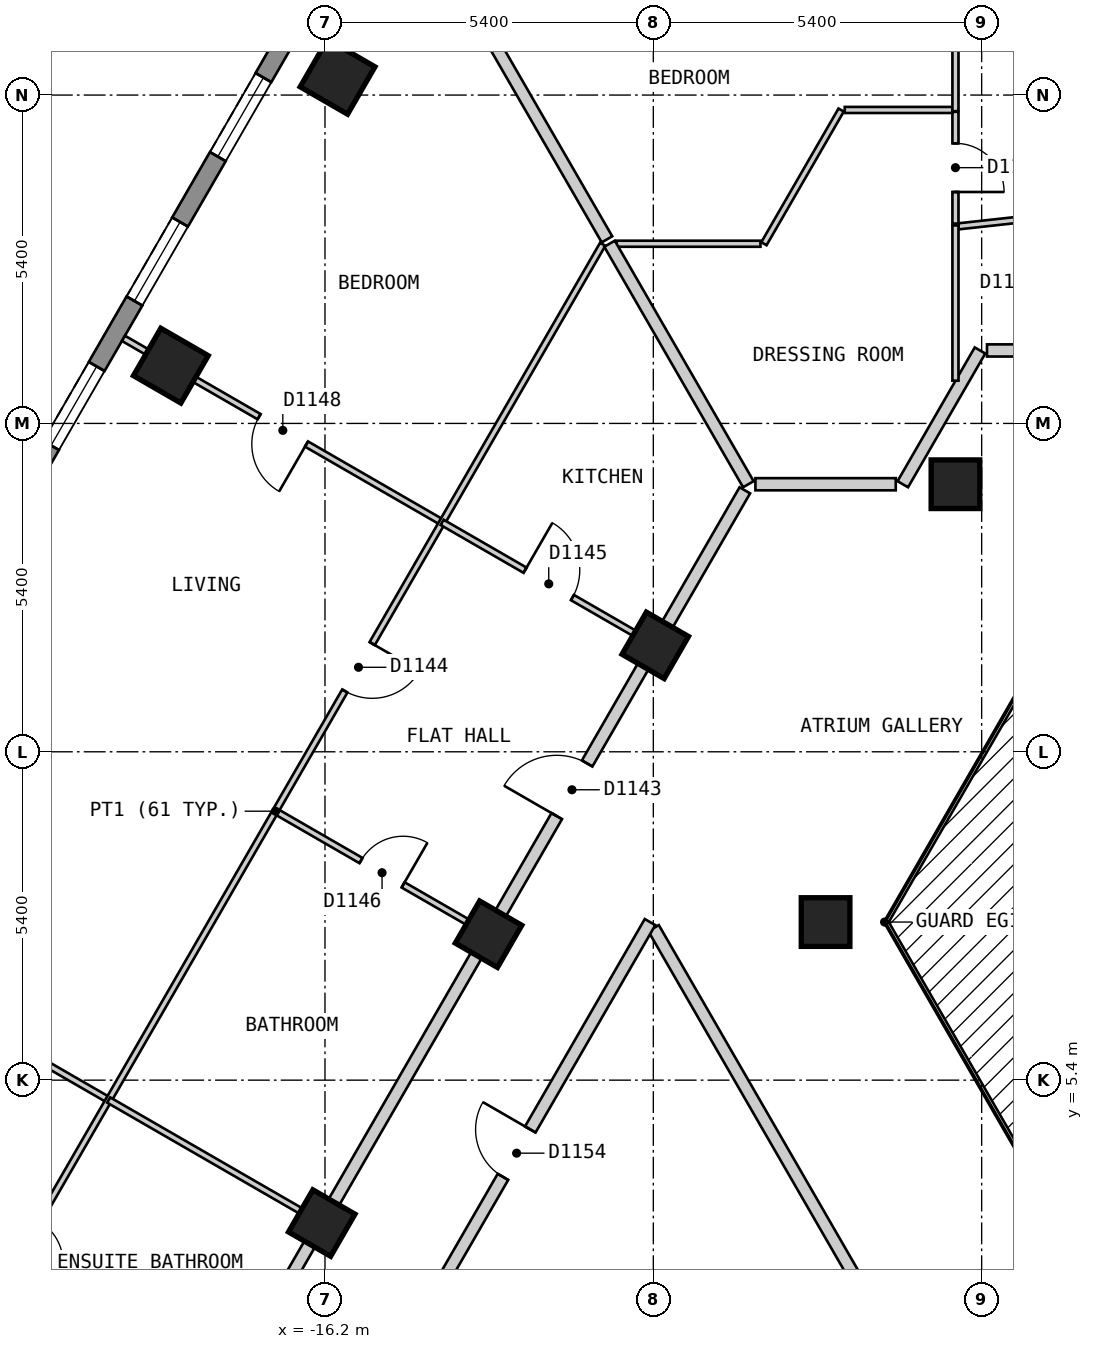
"""IFC4 building model, lengths in metres.
Left out: names, types, materials, properties, quantities, classifications, styles, units other than length and angle.
Written with IfcOpenShell. Run it as: python <this file> out.ifc"""

import sys

from ifc_helpers import new_model, si_unit, direction, frame, frame_2d, origin, origin_2d, place, context, subcontext, project, spatial, polyline, rectangle, outline, extrude, element, fill, save


model = new_model("IFC4")
c1 = context("Model", 3, precision=1e-05, world=origin(), true_north=direction((0.0, 1.0)))
c2 = subcontext(c1, "Body", "Model", "MODEL_VIEW")
j1 = project(units=[si_unit("LENGTHUNIT", "METRE"), si_unit("PLANEANGLEUNIT", "RADIAN")], contexts=[c1])
p1 = place(None, origin())
s1 = spatial("IfcSite", under=j1, at=p1, CompositionType="ELEMENT")
p2 = place(p1, origin())
s2 = spatial("IfcBuilding", under=s1, at=p2, CompositionType="ELEMENT")
p3 = place(p2, frame((0.0, 0.0, 138.6)))
s3 = spatial("IfcBuildingStorey", under=s2, at=p3, CompositionType="ELEMENT", Elevation=138.6)
for number, where, z_axis, x_axis in (
    (1, (-15.993, 21.9, 0.0), (0.0, 0.0, 1.0), (-0.5, -0.866, 0.0)),
    (2, (-18.735, 17.15, 0.0), (0.0, 0.0, 1.0), (-0.5, -0.866, 0.0)),
):
    element("IfcColumn", number, at=place(p3, frame(where, z_axis=z_axis, x_axis=x_axis)), inside=s3, PredefinedType="COLUMN", context=c2, shape_type="SweptSolid", body=[
        extrude(rectangle(XDim=0.9, YDim=0.9, at=origin_2d()), origin(), (0.0, 0.0, 1.0), 3.0),
    ])
for number, where, z_axis, x_axis in (
    (3, (-5.831, 15.2, 0.0), (0.0, 0.0, 1.0), (-1.0, 0.0, 0.0)),
    (4, (-10.768, 12.55, 0.0), (0.0, 0.0, 1.0), (-0.5, -0.866, 0.0)),
    (5, (-7.967, 8.0, 0.0), (0.0, 0.0, 1.0), (1.0, 0.0, 0.0)),
    (6, (-13.51, 7.8, 0.0), (0.0, 0.0, 1.0), (-0.5, -0.866, 0.0)),
    (7, (-16.253, 3.05, 0.0), (0.0, 0.0, 1.0), (-0.5, -0.866, 0.0)),
):
    element("IfcColumn", number, at=place(p3, frame(where, z_axis=z_axis, x_axis=x_axis)), inside=s3, PredefinedType="COLUMN", context=c2, shape_type="SweptSolid", body=[
        extrude(rectangle(XDim=0.8, YDim=0.8, at=origin_2d()), origin(), (0.0, 0.0, 1.0), 3.0),
    ])
p4 = place(p3, frame((-16.555, 23.025, 0.0), z_axis=(0.0, 0.0, 1.0), x_axis=(-0.500020536353, -0.866013546791, 0.0)))
e8 = element("IfcWall", 8, at=p4, inside=s3, PredefinedType="SOLIDWALL", context=c2, shape_type="SweptSolid", body=[
    extrude(outline(polyline([(0.0, -0.15), (23.325, -0.15), (23.245, 0.15), (0.08, 0.15), (0.0, -0.15)])), origin(), (0.0, 0.0, 1.0), 2.7),
])
p5 = place(p4, frame((1.314, 0.0, 0.15)))
e9 = element("IfcOpeningElement", 9, at=p5, cuts=e8, PredefinedType="OPENING", context=c2, shape_type="SweptSolid", body=[
    extrude(rectangle(XDim=1.5, YDim=2.1, at=frame_2d((0.75, 1.05))), frame((0.0, 0.16, 0.0), z_axis=(0.0, -1.0, 0.0), x_axis=(1.0, 0.0, 0.0)), (0.0, 0.0, 1.0), 0.32),
])
p6 = place(p4, frame((4.056, 0.0, 0.15)))
e10 = element("IfcOpeningElement", 10, at=p6, cuts=e8, PredefinedType="OPENING", context=c2, shape_type="SweptSolid", body=[
    extrude(rectangle(XDim=1.5, YDim=2.1, at=frame_2d((0.75, 1.05))), frame((0.0, 0.16, 0.0), z_axis=(0.0, -1.0, 0.0), x_axis=(1.0, 0.0, 0.0)), (0.0, 0.0, 1.0), 0.32),
])
p7 = place(p4, frame((6.799, 0.0, 0.15)))
e11 = element("IfcOpeningElement", 11, at=p7, cuts=e8, PredefinedType="OPENING", context=c2, shape_type="SweptSolid", body=[
    extrude(rectangle(XDim=1.5, YDim=2.1, at=frame_2d((0.75, 1.05))), frame((0.0, 0.16, 0.0), z_axis=(0.0, -1.0, 0.0), x_axis=(1.0, 0.0, 0.0)), (0.0, 0.0, 1.0), 0.32),
])
p8 = place(p4, frame((9.541, 0.0, 0.15)))
e12 = element("IfcOpeningElement", 12, at=p8, cuts=e8, PredefinedType="OPENING", context=c2, shape_type="SweptSolid", body=[
    extrude(rectangle(XDim=1.5, YDim=2.1, at=frame_2d((0.75, 1.05))), frame((0.0, 0.16, 0.0), z_axis=(0.0, -1.0, 0.0), x_axis=(1.0, 0.0, 0.0)), (0.0, 0.0, 1.0), 0.32),
])
p9 = place(p4, frame((12.285, 0.0, 0.15)))
e13 = element("IfcOpeningElement", 13, at=p9, cuts=e8, PredefinedType="OPENING", context=c2, shape_type="SweptSolid", body=[
    extrude(rectangle(XDim=1.5, YDim=2.1, at=frame_2d((0.75, 1.05))), frame((0.0, 0.16, 0.0), z_axis=(0.0, -1.0, 0.0), x_axis=(1.0, 0.0, 0.0)), (0.0, 0.0, 1.0), 0.32),
])
p10 = place(p4, frame((15.027, 0.0, 0.15)))
e14 = element("IfcOpeningElement", 14, at=p10, cuts=e8, PredefinedType="OPENING", context=c2, shape_type="SweptSolid", body=[
    extrude(rectangle(XDim=1.5, YDim=2.1, at=frame_2d((0.75, 1.05))), frame((0.0, 0.16, 0.0), z_axis=(0.0, -1.0, 0.0), x_axis=(1.0, 0.0, 0.0)), (0.0, 0.0, 1.0), 0.32),
])
p11 = place(p4, frame((17.769, 0.0, 0.15)))
e15 = element("IfcOpeningElement", 15, at=p11, cuts=e8, PredefinedType="OPENING", context=c2, shape_type="SweptSolid", body=[
    extrude(rectangle(XDim=1.5, YDim=2.1, at=frame_2d((0.75, 1.05))), frame((0.0, 0.16, 0.0), z_axis=(0.0, -1.0, 0.0), x_axis=(1.0, 0.0, 0.0)), (0.0, 0.0, 1.0), 0.32),
])
p12 = place(p4, frame((20.512, 0.0, 0.15)))
e16 = element("IfcOpeningElement", 16, at=p12, cuts=e8, PredefinedType="OPENING", context=c2, shape_type="SweptSolid", body=[
    extrude(rectangle(XDim=1.5, YDim=2.1, at=frame_2d((0.75, 1.05))), frame((0.0, 0.16, 0.0), z_axis=(0.0, -1.0, 0.0), x_axis=(1.0, 0.0, 0.0)), (0.0, 0.0, 1.0), 0.32),
])
p13 = place(p3, frame((-10.796, 7.9, 0.0), z_axis=(0.0, 0.0, 1.0), x_axis=(0.499954271211, -0.866051803703, 0.0)))
e17 = element("IfcWall", 17, at=p13, inside=s3, PredefinedType="PARTITIONING", context=c2, shape_type="SweptSolid", body=[
    extrude(rectangle(XDim=7.536, YDim=0.2, at=frame_2d((3.768, 0.0))), origin(), (0.0, 0.0, 1.0), 2.7),
])
p14 = place(p3, frame((-9.121, 15.2, 0.0), z_axis=(0.0, 0.0, 1.0), x_axis=(1.0, 0.0, 0.0)))
e18 = element("IfcWall", 18, at=p14, inside=s3, PredefinedType="PARTITIONING", context=c2, shape_type="SweptSolid", body=[
    extrude(rectangle(XDim=2.308, YDim=0.2, at=frame_2d((1.154, 0.0))), origin(), (0.0, 0.0, 1.0), 2.7),
])
p15 = place(p3, frame((-5.312, 17.4, 0.0), z_axis=(0.0, 0.0, 1.0), x_axis=(1.0, 0.0, 0.0)))
e19 = element("IfcWall", 19, at=p15, inside=s3, PredefinedType="PARTITIONING", context=c2, shape_type="SweptSolid", body=[
    extrude(rectangle(XDim=10.739, YDim=0.2, at=frame_2d((5.37, 0.0))), origin(), (0.0, 0.0, 1.0), 2.7),
])
p16 = place(p15, frame((7.538, 0.0, 0.0)))
e20 = element("IfcOpeningElement", 20, at=p16, cuts=e19, PredefinedType="OPENING", context=c2, shape_type="SweptSolid", body=[
    extrude(rectangle(XDim=1.0, YDim=2.1, at=frame_2d((0.5, 1.05))), frame((0.0, 0.11, 0.0), z_axis=(0.0, -1.0, 0.0), x_axis=(1.0, 0.0, 0.0)), (0.0, 0.0, 1.0), 0.22),
])
p17 = place(p15, frame((1.864, 0.0, 0.0)))
e21 = element("IfcOpeningElement", 21, at=p17, cuts=e19, PredefinedType="OPENING", context=c2, shape_type="SweptSolid", body=[
    extrude(rectangle(XDim=1.0, YDim=2.1, at=frame_2d((0.5, 1.05))), frame((0.0, 0.11, 0.0), z_axis=(0.0, -1.0, 0.0), x_axis=(1.0, 0.0, 0.0)), (0.0, 0.0, 1.0), 0.22),
])
p18 = place(p3, frame((-15.242, 0.399, 0.0), z_axis=(0.0, 0.0, 1.0), x_axis=(0.499953615651, 0.866052182145, 0.0)))
e22 = element("IfcWall", 22, at=p18, inside=s3, PredefinedType="PARTITIONING", context=c2, shape_type="SweptSolid", body=[
    extrude(rectangle(XDim=8.777, YDim=0.2, at=frame_2d((4.388, 0.0))), origin(), (0.0, 0.0, 1.0), 2.7),
])
p19 = place(p18, frame((3.938, 0.0, 0.0)))
e23 = element("IfcOpeningElement", 23, at=p19, cuts=e22, PredefinedType="OPENING", context=c2, shape_type="SweptSolid", body=[
    extrude(rectangle(XDim=0.9, YDim=2.1, at=frame_2d((0.45, 1.05))), frame((0.0, 0.11, 0.0), z_axis=(0.0, -1.0, 0.0), x_axis=(1.0, 0.0, 0.0)), (0.0, 0.0, 1.0), 0.22),
])
p20 = place(p3, frame((-6.697, 15.2, 0.0), z_axis=(0.0, 0.0, 1.0), x_axis=(0.499963722229, 0.866046347752, 0.0)))
e24 = element("IfcWall", 24, at=p20, inside=s3, PredefinedType="PARTITIONING", context=c2, shape_type="SweptSolid", body=[
    extrude(rectangle(XDim=2.54, YDim=0.2, at=frame_2d((1.27, 0.0))), origin(), (0.0, 0.0, 1.0), 2.7),
])
p21 = place(p3, frame((-17.724, 0.5, 0.0), z_axis=(0.0, 0.0, 1.0), x_axis=(0.499992388462, 0.866029798263, 0.0)))
e25 = element("IfcWall", 25, at=p21, inside=s3, PredefinedType="PARTITIONING", context=c2, shape_type="SweptSolid", body=[
    extrude(rectangle(XDim=16.859, YDim=0.2, at=frame_2d((8.429, 0.0))), origin(), (0.0, 0.0, 1.0), 2.7),
])
p22 = place(p21, frame((10.672, 0.0, 0.0)))
e26 = element("IfcOpeningElement", 26, at=p22, cuts=e25, PredefinedType="OPENING", context=c2, shape_type="SweptSolid", body=[
    extrude(rectangle(XDim=1.0, YDim=2.1, at=frame_2d((0.5, 1.05))), frame((0.0, 0.11, 0.0), z_axis=(0.0, -1.0, 0.0), x_axis=(1.0, 0.0, 0.0)), (0.0, 0.0, 1.0), 0.22),
])
p23 = place(p3, frame((-5.831, 21.325, 0.0), z_axis=(0.0, 0.0, 1.0), x_axis=(0.0, -1.0, 0.0)))
e27 = element("IfcWall", 27, at=p23, inside=s3, PredefinedType="PARTITIONING", context=c2, shape_type="SweptSolid", body=[
    extrude(rectangle(XDim=1.839, YDim=0.1, at=frame_2d((0.919, 0.0))), origin(), (0.0, 0.0, 1.0), 2.7),
])
p24 = place(p23, frame((0.519, 0.0, 0.0)))
e28 = element("IfcOpeningElement", 28, at=p24, cuts=e27, PredefinedType="OPENING", context=c2, shape_type="SweptSolid", body=[
    extrude(rectangle(XDim=0.8, YDim=2.1, at=frame_2d((0.4, 1.05))), frame((0.0, 0.06, 0.0), z_axis=(0.0, -1.0, 0.0), x_axis=(1.0, 0.0, 0.0)), (0.0, 0.0, 1.0), 0.12),
])
p25 = place(p3, frame((-24.999, 8.1, 0.0), z_axis=(0.0, 0.0, 1.0), x_axis=(0.865978029808, -0.500082045158, 0.0)))
e29 = element("IfcWall", 29, at=p25, inside=s3, PredefinedType="PARTITIONING", context=c2, shape_type="SweptSolid", body=[
    extrude(rectangle(XDim=6.053, YDim=0.1, at=frame_2d((3.027, 0.0))), origin(), (0.0, 0.0, 1.0), 2.7),
])
p26 = place(p25, frame((2.577, 0.0, 0.0)))
e30 = element("IfcOpeningElement", 30, at=p26, cuts=e29, PredefinedType="OPENING", context=c2, shape_type="SweptSolid", body=[
    extrude(rectangle(XDim=0.9, YDim=2.1, at=frame_2d((0.45, 1.05))), frame((0.0, 0.06, 0.0), z_axis=(0.0, -1.0, 0.0), x_axis=(1.0, 0.0, 0.0)), (0.0, 0.0, 1.0), 0.12),
])
p27 = place(p3, frame((-16.971, 9.798, 0.0), z_axis=(0.0, 0.0, 1.0), x_axis=(0.866087525071, -0.499892387336, 0.0)))
e31 = element("IfcWall", 31, at=p27, inside=s3, PredefinedType="PARTITIONING", context=c2, shape_type="SweptSolid", body=[
    extrude(rectangle(XDim=3.897, YDim=0.1, at=frame_2d((1.948, 0.0))), origin(), (0.0, 0.0, 1.0), 2.7),
])
p28 = place(p27, frame((1.574, 0.0, 0.0)))
e32 = element("IfcOpeningElement", 32, at=p28, cuts=e31, PredefinedType="OPENING", context=c2, shape_type="SweptSolid", body=[
    extrude(rectangle(XDim=0.8, YDim=2.1, at=frame_2d((0.4, 1.05))), frame((0.0, 0.06, 0.0), z_axis=(0.0, -1.0, 0.0), x_axis=(1.0, 0.0, 0.0)), (0.0, 0.0, 1.0), 0.12),
])
p29 = place(p3, frame((-19.514, 17.599, 0.0), z_axis=(0.0, 0.0, 1.0), x_axis=(0.866007554612, -0.500030914399, 0.0)))
e33 = element("IfcWall", 33, at=p29, inside=s3, PredefinedType="PARTITIONING", context=c2, shape_type="SweptSolid", body=[
    extrude(rectangle(XDim=6.052, YDim=0.1, at=frame_2d((3.026, 0.0))), origin(), (0.0, 0.0, 1.0), 2.7),
])
p30 = place(p29, frame((2.576, 0.0, 0.0)))
e34 = element("IfcOpeningElement", 34, at=p30, cuts=e33, PredefinedType="OPENING", context=c2, shape_type="SweptSolid", body=[
    extrude(rectangle(XDim=0.9, YDim=2.1, at=frame_2d((0.45, 1.05))), frame((0.0, 0.06, 0.0), z_axis=(0.0, -1.0, 0.0), x_axis=(1.0, 0.0, 0.0)), (0.0, 0.0, 1.0), 0.12),
])
p31 = place(p3, frame((-11.405, 19.155, 0.0), z_axis=(0.0, 0.0, 1.0), x_axis=(1.0, 0.0, 0.0)))
e35 = element("IfcWall", 35, at=p31, inside=s3, PredefinedType="PARTITIONING", context=c2, shape_type="SweptSolid", body=[
    extrude(rectangle(XDim=2.367, YDim=0.1, at=frame_2d((1.184, 0.0))), origin(), (0.0, 0.0, 1.0), 2.7),
])
p32 = place(p3, frame((-7.652, 21.355, 0.0), z_axis=(0.0, 0.0, 1.0), x_axis=(1.0, 0.0, 0.0)))
e36 = element("IfcWall", 36, at=p32, inside=s3, PredefinedType="PARTITIONING", context=c2, shape_type="SweptSolid", body=[
    extrude(rectangle(XDim=1.771, YDim=0.1, at=frame_2d((0.885, 0.0))), origin(), (0.0, 0.0, 1.0), 2.7),
])
p33 = place(p3, frame((-8.981, 19.155, 0.0), z_axis=(0.0, 0.0, 1.0), x_axis=(0.500130227609, 0.865950203783, 0.0)))
e37 = element("IfcWall", 37, at=p33, inside=s3, PredefinedType="PARTITIONING", context=c2, shape_type="SweptSolid", body=[
    extrude(rectangle(XDim=2.539, YDim=0.1, at=frame_2d((1.27, 0.0))), origin(), (0.0, 0.0, 1.0), 2.7),
])
p34 = place(p3, frame((-22.398, 0.499, 0.0), z_axis=(0.0, 0.0, 1.0), x_axis=(0.499981561717, 0.866036048871, 0.0)))
e38 = element("IfcWall", 38, at=p34, inside=s3, PredefinedType="PARTITIONING", context=c2, shape_type="SweptSolid", body=[
    extrude(rectangle(XDim=21.532, YDim=0.1, at=frame_2d((10.766, 0.0))), origin(), (0.0, 0.0, 1.0), 2.7),
])
p35 = place(p34, frame((13.049, 0.0, 0.0)))
e39 = element("IfcOpeningElement", 39, at=p35, cuts=e38, PredefinedType="OPENING", context=c2, shape_type="SweptSolid", body=[
    extrude(rectangle(XDim=0.9, YDim=2.1, at=frame_2d((0.45, 1.05))), frame((0.0, 0.06, 0.0), z_axis=(0.0, -1.0, 0.0), x_axis=(1.0, 0.0, 0.0)), (0.0, 0.0, 1.0), 0.12),
])
p36 = place(p34, frame((2.183, 0.0, 0.0)))
e40 = element("IfcOpeningElement", 40, at=p36, cuts=e38, PredefinedType="OPENING", context=c2, shape_type="SweptSolid", body=[
    extrude(rectangle(XDim=0.8, YDim=2.1, at=frame_2d((0.4, 1.05))), frame((0.0, 0.06, 0.0), z_axis=(0.0, -1.0, 0.0), x_axis=(1.0, 0.0, 0.0)), (0.0, 0.0, 1.0), 0.12),
])
p37 = place(p3, frame((-5.781, 19.441, 0.0), z_axis=(0.0, 0.0, 1.0), x_axis=(0.994005576935, 0.109329378588, 0.0)))
e41 = element("IfcWall", 41, at=p37, inside=s3, PredefinedType="PARTITIONING", context=c2, shape_type="SweptSolid", body=[
    extrude(rectangle(XDim=3.477, YDim=0.1, at=frame_2d((1.738, 0.0))), origin(), (0.0, 0.0, 1.0), 2.7),
])
p38 = place(p3, frame((-5.831, 16.903, 0.0), z_axis=(0.0, 0.0, 1.0), x_axis=(0.0, 1.0, 0.0)))
e42 = element("IfcWall", 42, at=p38, inside=s3, PredefinedType="PARTITIONING", context=c2, shape_type="SweptSolid", body=[
    extrude(rectangle(XDim=2.553, YDim=0.1, at=frame_2d((1.276, 0.0))), origin(), (0.0, 0.0, 1.0), 2.7),
])
p39 = place(p3, frame((-5.831, 21.335, 0.0), z_axis=(0.0, 0.0, 1.0), x_axis=(0.0, 1.0, 0.0)))
e43 = element("IfcWall", 43, at=p39, inside=s3, PredefinedType="PARTITIONING", context=c2, shape_type="SweptSolid", body=[
    extrude(rectangle(XDim=3.965, YDim=0.1, at=frame_2d((1.982, 0.0))), origin(), (0.0, 0.0, 1.0), 2.7),
])
p40 = place(p39, frame((1.533, 0.0, 0.0)))
e44 = element("IfcOpeningElement", 44, at=p40, cuts=e43, PredefinedType="OPENING", context=c2, shape_type="SweptSolid", body=[
    extrude(rectangle(XDim=0.9, YDim=2.1, at=frame_2d((0.45, 1.05))), frame((0.0, 0.06, 0.0), z_axis=(0.0, -1.0, 0.0), x_axis=(1.0, 0.0, 0.0)), (0.0, 0.0, 1.0), 0.12),
])
p41 = place(p3, frame((-14.37, 24.09, 0.0), z_axis=(0.0, 0.0, 1.0), x_axis=(0.500057386422, -0.865992269183, 0.0)))
e45 = element("IfcWall", 45, at=p41, inside=s3, PredefinedType="PARTITIONING", context=c2, shape_type="SweptSolid", body=[
    extrude(rectangle(XDim=5.615, YDim=0.2, at=frame_2d((2.808, 0.0))), origin(), (0.0, 0.0, 1.0), 2.7),
])
p42 = place(p3, frame((-11.52, 19.155, 0.0), z_axis=(0.0, 0.0, 1.0), x_axis=(0.499916824138, -0.866073420066, 0.0)))
e46 = element("IfcWall", 46, at=p42, inside=s3, PredefinedType="PARTITIONING", context=c2, shape_type="SweptSolid", body=[
    extrude(rectangle(XDim=4.567, YDim=0.2, at=frame_2d((2.283, 0.0))), origin(), (0.0, 0.0, 1.0), 2.7),
])
p43 = place(p3, frame((-19.757, 5.073, 0.0), z_axis=(0.0, 0.0, 1.0), x_axis=(0.866076396086, -0.499911668341, 0.0)))
e47 = element("IfcWall", 47, at=p43, inside=s3, PredefinedType="PARTITIONING", context=c2, shape_type="SweptSolid", body=[
    extrude(rectangle(XDim=3.947, YDim=0.1, at=frame_2d((1.973, 0.0))), origin(), (0.0, 0.0, 1.0), 2.7),
])
p44 = place(p3, frame((-14.273, 14.573, 0.0), z_axis=(0.0, 0.0, 1.0), x_axis=(0.866138216955, -0.499804550929, 0.0)))
e48 = element("IfcWall", 48, at=p44, inside=s3, PredefinedType="PARTITIONING", context=c2, shape_type="SweptSolid", body=[
    extrude(rectangle(XDim=3.947, YDim=0.1, at=frame_2d((1.974, 0.0))), origin(), (0.0, 0.0, 1.0), 2.7),
])
p45 = place(p44, frame((1.574, 0.0, 0.0)))
e49 = element("IfcOpeningElement", 49, at=p45, cuts=e48, PredefinedType="OPENING", context=c2, shape_type="SweptSolid", body=[
    extrude(rectangle(XDim=0.9, YDim=2.1, at=frame_2d((0.45, 1.05))), frame((0.0, 0.06, 0.0), z_axis=(0.0, -1.0, 0.0), x_axis=(1.0, 0.0, 0.0)), (0.0, 0.0, 1.0), 0.12),
])
p46 = place(p5, origin())
e50 = element("IfcWindow", 50, at=p46, inside=s3, PartitioningType="SINGLE_PANEL", PredefinedType="WINDOW", context=c2, shape_type="SweptSolid", body=[
    extrude(rectangle(XDim=1.5, YDim=2.1, at=frame_2d((0.75, 1.05))), frame((0.0, 0.03, 0.0), z_axis=(0.0, -1.0, 0.0), x_axis=(1.0, 0.0, 0.0)), (0.0, 0.0, 1.0), 0.06),
])
fill(e9, e50)
p47 = place(p6, origin())
e51 = element("IfcWindow", 51, at=p47, inside=s3, PartitioningType="SINGLE_PANEL", PredefinedType="WINDOW", context=c2, shape_type="SweptSolid", body=[
    extrude(rectangle(XDim=1.5, YDim=2.1, at=frame_2d((0.75, 1.05))), frame((0.0, 0.03, 0.0), z_axis=(0.0, -1.0, 0.0), x_axis=(1.0, 0.0, 0.0)), (0.0, 0.0, 1.0), 0.06),
])
fill(e10, e51)
p48 = place(p7, origin())
e52 = element("IfcWindow", 52, at=p48, inside=s3, PartitioningType="SINGLE_PANEL", PredefinedType="WINDOW", context=c2, shape_type="SweptSolid", body=[
    extrude(rectangle(XDim=1.5, YDim=2.1, at=frame_2d((0.75, 1.05))), frame((0.0, 0.03, 0.0), z_axis=(0.0, -1.0, 0.0), x_axis=(1.0, 0.0, 0.0)), (0.0, 0.0, 1.0), 0.06),
])
fill(e11, e52)
p49 = place(p24, origin())
e53 = element("IfcDoor", 53, at=p49, inside=s3, OperationType="SINGLE_SWING_RIGHT", PredefinedType="DOOR", context=c2, shape_type="SweptSolid", body=[
    extrude(rectangle(XDim=0.8, YDim=2.1, at=frame_2d((0.4, 1.05))), frame((0.0, 0.025, 0.0), z_axis=(0.0, -1.0, 0.0), x_axis=(1.0, 0.0, 0.0)), (0.0, 0.0, 1.0), 0.05),
])
fill(e28, e53)
p50 = place(p22, origin())
e54 = element("IfcDoor", 54, at=p50, inside=s3, OperationType="SINGLE_SWING_LEFT", PredefinedType="DOOR", context=c2, shape_type="SweptSolid", body=[
    extrude(rectangle(XDim=1.0, YDim=2.1, at=frame_2d((0.5, 1.05))), frame((0.0, 0.025, 0.0), z_axis=(0.0, -1.0, 0.0), x_axis=(1.0, 0.0, 0.0)), (0.0, 0.0, 1.0), 0.05),
])
fill(e26, e54)
p51 = place(p35, origin())
e55 = element("IfcDoor", 55, at=p51, inside=s3, OperationType="SINGLE_SWING_RIGHT", PredefinedType="DOOR", context=c2, shape_type="SweptSolid", body=[
    extrude(rectangle(XDim=0.9, YDim=2.1, at=frame_2d((0.45, 1.05))), frame((0.0, 0.025, 0.0), z_axis=(0.0, -1.0, 0.0), x_axis=(1.0, 0.0, 0.0)), (0.0, 0.0, 1.0), 0.05),
])
fill(e39, e55)
p52 = place(p45, origin())
e56 = element("IfcDoor", 56, at=p52, inside=s3, OperationType="SINGLE_SWING_LEFT", PredefinedType="DOOR", context=c2, shape_type="SweptSolid", body=[
    extrude(rectangle(XDim=0.9, YDim=2.1, at=frame_2d((0.45, 1.05))), frame((0.0, 0.025, 0.0), z_axis=(0.0, -1.0, 0.0), x_axis=(1.0, 0.0, 0.0)), (0.0, 0.0, 1.0), 0.05),
])
fill(e49, e56)
p53 = place(p28, origin())
e57 = element("IfcDoor", 57, at=p53, inside=s3, OperationType="SINGLE_SWING_RIGHT", PredefinedType="DOOR", context=c2, shape_type="SweptSolid", body=[
    extrude(rectangle(XDim=0.8, YDim=2.1, at=frame_2d((0.4, 1.05))), frame((0.0, 0.025, 0.0), z_axis=(0.0, -1.0, 0.0), x_axis=(1.0, 0.0, 0.0)), (0.0, 0.0, 1.0), 0.05),
])
fill(e32, e57)
p54 = place(p30, origin())
e58 = element("IfcDoor", 58, at=p54, inside=s3, OperationType="SINGLE_SWING_RIGHT", PredefinedType="DOOR", context=c2, shape_type="SweptSolid", body=[
    extrude(rectangle(XDim=0.9, YDim=2.1, at=frame_2d((0.45, 1.05))), frame((0.0, 0.025, 0.0), z_axis=(0.0, -1.0, 0.0), x_axis=(1.0, 0.0, 0.0)), (0.0, 0.0, 1.0), 0.05),
])
fill(e34, e58)
p55 = place(p19, origin())
e59 = element("IfcDoor", 59, at=p55, inside=s3, OperationType="SINGLE_SWING_RIGHT", PredefinedType="DOOR", context=c2, shape_type="SweptSolid", body=[
    extrude(rectangle(XDim=0.9, YDim=2.1, at=frame_2d((0.45, 1.05))), frame((0.0, 0.025, 0.0), z_axis=(0.0, -1.0, 0.0), x_axis=(1.0, 0.0, 0.0)), (0.0, 0.0, 1.0), 0.05),
])
fill(e23, e59)
save(model, sys.argv[1])
